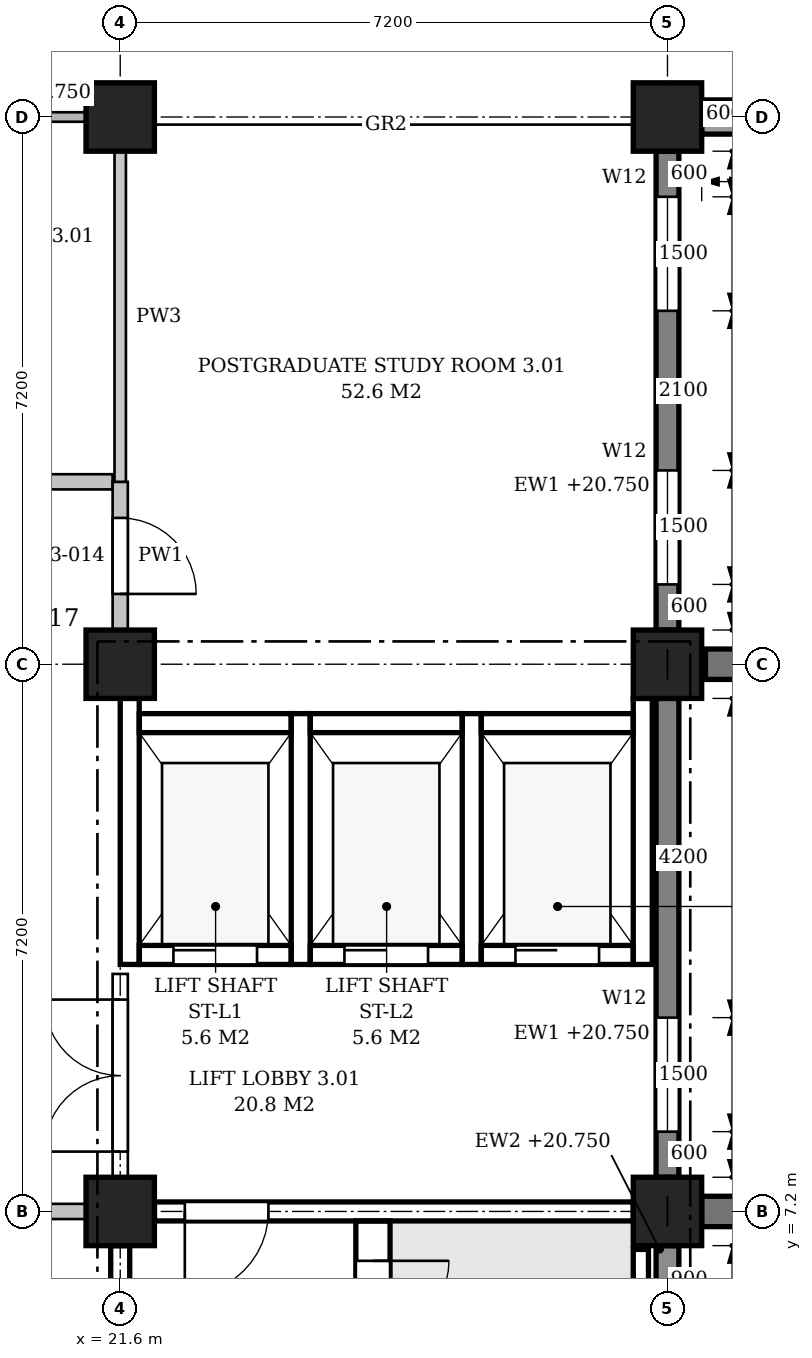
"""IFC4 building model, lengths in metres.
Left out: names, types, materials, properties, quantities, classifications, styles, units other than length and angle.
Written with IfcOpenShell. Run it as: python <this file> out.ifc"""

import sys

from ifc_helpers import new_model, si_unit, direction, frame, frame_2d, origin, origin_2d, place, context, subcontext, project, spatial, polyline, rectangle, outline, extrude, element, fill, save


model = new_model("IFC4")
c1 = context("Model", 3, precision=1e-05, world=origin(), true_north=direction((0.0, 1.0)))
c2 = subcontext(c1, "Body", "Model", "MODEL_VIEW")
j1 = project(units=[si_unit("LENGTHUNIT", "METRE"), si_unit("PLANEANGLEUNIT", "RADIAN")], contexts=[c1])
p1 = place(None, origin())
s1 = spatial("IfcSite", under=j1, at=p1, CompositionType="ELEMENT")
p2 = place(p1, origin())
s2 = spatial("IfcBuilding", under=s1, at=p2, CompositionType="ELEMENT")
p3 = place(p2, frame((0.0, 0.0, 16.8)))
s3 = spatial("IfcBuildingStorey", under=s2, at=p3, CompositionType="ELEMENT", Elevation=16.8)
for number, where, z_axis, x_axis in (
    (1, (21.6, 7.2, 0.0), (0.0, 0.0, 1.0), (1.0, 0.0, 0.0)),
    (2, (21.6, 14.4, 0.0), (0.0, 0.0, 1.0), (1.0, 0.0, 0.0)),
    (3, (21.6, 21.6, 0.0), (0.0, 0.0, 1.0), (1.0, 0.0, 0.0)),
    (4, (28.8, 7.2, 0.0), (0.0, 0.0, 1.0), (1.0, 0.0, 0.0)),
    (5, (28.8, 14.4, 0.0), (0.0, 0.0, 1.0), (1.0, 0.0, 0.0)),
    (6, (28.8, 21.6, 0.0), (0.0, 0.0, 1.0), (1.0, 0.0, 0.0)),
):
    element("IfcColumn", number, at=place(p3, frame(where, z_axis=z_axis, x_axis=x_axis)), inside=s3, PredefinedType="COLUMN", context=c2, shape_type="SweptSolid", body=[
        extrude(rectangle(XDim=0.9, YDim=0.9, at=origin_2d()), origin(), (0.0, 0.0, 1.0), 4.8),
    ])
p4 = place(p3, frame((28.8, 0.45, 0.0), z_axis=(0.0, 0.0, 1.0), x_axis=(0.0, 1.0, 0.0)))
e7 = element("IfcWall", 7, at=p4, inside=s3, PredefinedType="STANDARD", context=c2, shape_type="SweptSolid", body=[
    extrude(rectangle(XDim=6.3, YDim=0.3, at=frame_2d((3.15, 0.0))), origin(), (0.0, 0.0, 1.0), 3.95),
])
p5 = place(p4, frame((0.9, 0.0, 0.9)))
e8 = element("IfcOpeningElement", 8, at=p5, cuts=e7, PredefinedType="OPENING", context=c2, shape_type="SweptSolid", body=[
    extrude(outline(polyline([(0.0, 0.0), (0.9, 0.0), (0.9, 2.05), (0.45, 2.5), (0.0, 2.05), (0.0, 0.0)])), frame((0.0, 0.16, 0.0), z_axis=(0.0, -1.0, 0.0), x_axis=(1.0, 0.0, 0.0)), (0.0, 0.0, 1.0), 0.32),
])
p6 = place(p4, frame((4.5, 0.0, 0.9)))
e9 = element("IfcOpeningElement", 9, at=p6, cuts=e7, PredefinedType="OPENING", context=c2, shape_type="SweptSolid", body=[
    extrude(outline(polyline([(0.0, 0.0), (0.9, 0.0), (0.9, 2.05), (0.45, 2.5), (0.0, 2.05), (0.0, 0.0)])), frame((0.0, 0.16, 0.0), z_axis=(0.0, -1.0, 0.0), x_axis=(1.0, 0.0, 0.0)), (0.0, 0.0, 1.0), 0.32),
])
p7 = place(p3, frame((28.8, 7.65, 0.0), z_axis=(0.0, 0.0, 1.0), x_axis=(0.0, 1.0, 0.0)))
e10 = element("IfcWall", 10, at=p7, inside=s3, PredefinedType="STANDARD", context=c2, shape_type="SweptSolid", body=[
    extrude(rectangle(XDim=6.3, YDim=0.3, at=frame_2d((3.15, 0.0))), origin(), (0.0, 0.0, 1.0), 3.95),
])
p8 = place(p7, frame((0.6, 0.0, 0.9)))
e11 = element("IfcOpeningElement", 11, at=p8, cuts=e10, PredefinedType="OPENING", context=c2, shape_type="SweptSolid", body=[
    extrude(outline(polyline([(0.0, 0.0), (1.5, 0.0), (1.5, 1.75), (0.75, 2.5), (0.0, 1.75), (0.0, 0.0)])), frame((0.0, 0.16, 0.0), z_axis=(0.0, -1.0, 0.0), x_axis=(1.0, 0.0, 0.0)), (0.0, 0.0, 1.0), 0.32),
])
p9 = place(p3, frame((28.8, 14.85, 0.0), z_axis=(0.0, 0.0, 1.0), x_axis=(0.0, 1.0, 0.0)))
e12 = element("IfcWall", 12, at=p9, inside=s3, PredefinedType="STANDARD", context=c2, shape_type="SweptSolid", body=[
    extrude(rectangle(XDim=6.3, YDim=0.3, at=frame_2d((3.15, 0.0))), origin(), (0.0, 0.0, 1.0), 3.95),
])
p10 = place(p9, frame((0.6, 0.0, 0.9)))
e13 = element("IfcOpeningElement", 13, at=p10, cuts=e12, PredefinedType="OPENING", context=c2, shape_type="SweptSolid", body=[
    extrude(outline(polyline([(0.0, 0.0), (1.5, 0.0), (1.5, 1.75), (0.75, 2.5), (0.0, 1.75), (0.0, 0.0)])), frame((0.0, 0.16, 0.0), z_axis=(0.0, -1.0, 0.0), x_axis=(1.0, 0.0, 0.0)), (0.0, 0.0, 1.0), 0.32),
])
p11 = place(p9, frame((4.2, 0.0, 0.9)))
e14 = element("IfcOpeningElement", 14, at=p11, cuts=e12, PredefinedType="OPENING", context=c2, shape_type="SweptSolid", body=[
    extrude(outline(polyline([(0.0, 0.0), (1.5, 0.0), (1.5, 1.75), (0.75, 2.5), (0.0, 1.75), (0.0, 0.0)])), frame((0.0, 0.16, 0.0), z_axis=(0.0, -1.0, 0.0), x_axis=(1.0, 0.0, 0.0)), (0.0, 0.0, 1.0), 0.32),
])
p12 = place(p3, frame((29.25, 21.6, 0.0), z_axis=(0.0, 0.0, 1.0), x_axis=(1.0, 0.0, 0.0)))
e15 = element("IfcWall", 15, at=p12, inside=s3, PredefinedType="STANDARD", context=c2, shape_type="SweptSolid", body=[
    extrude(rectangle(XDim=6.325, YDim=0.45, at=frame_2d((3.163, 0.0))), origin(), (0.0, 0.0, 1.0), 3.5),
])
p13 = place(p12, frame((0.6, 0.0, 0.9)))
e16 = element("IfcOpeningElement", 16, at=p13, cuts=e15, PredefinedType="OPENING", context=c2, shape_type="SweptSolid", body=[
    extrude(outline(polyline([(0.0, 0.0), (1.5, 0.0), (1.5, 1.75), (0.75, 2.5), (0.0, 1.75), (0.0, 0.0)])), frame((0.0, 0.235, 0.0), z_axis=(0.0, -1.0, 0.0), x_axis=(1.0, 0.0, 0.0)), (0.0, 0.0, 1.0), 0.47),
])
p14 = place(p12, frame((4.2, 0.0, 0.9)))
e17 = element("IfcOpeningElement", 17, at=p14, cuts=e15, PredefinedType="OPENING", context=c2, shape_type="SweptSolid", body=[
    extrude(outline(polyline([(0.0, 0.0), (1.5, 0.0), (1.5, 1.75), (0.75, 2.5), (0.0, 1.75), (0.0, 0.0)])), frame((0.0, 0.235, 0.0), z_axis=(0.0, -1.0, 0.0), x_axis=(1.0, 0.0, 0.0)), (0.0, 0.0, 1.0), 0.47),
])
for number, where, z_axis, x_axis in (
    (18, (29.25, 7.2, 0.0), (0.0, 0.0, 1.0), (1.0, 0.0, 0.0)),
    (19, (29.3, 14.4, 0.0), (0.0, 0.0, 1.0), (1.0, 0.0, 0.0)),
):
    element("IfcWall", number, at=place(p3, frame(where, z_axis=z_axis, x_axis=x_axis)), inside=s3, PredefinedType="POLYGONAL", context=c2, shape_type="SweptSolid", body=[
        extrude(outline(polyline([(0.6, 0.0), (0.6, 4.55), (0.0, 4.55), (0.0, 0.0), (0.6, 0.0)])), frame((0.0, 0.2, 0.0), z_axis=(0.0, -1.0, 0.0), x_axis=(1.0, 0.0, 0.0)), (0.0, 0.0, 1.0), 0.4),
    ])
p15 = place(p3, frame((22.05, 7.2, 0.0), z_axis=(0.0, 0.0, 1.0), x_axis=(1.0, 0.0, 0.0)))
e20 = element("IfcWall", 20, at=p15, inside=s3, PredefinedType="SHEAR", context=c2, shape_type="SweptSolid", body=[
    extrude(rectangle(XDim=6.3, YDim=0.25, at=frame_2d((3.15, 0.0))), origin(), (0.0, 0.0, 1.0), 3.8),
])
p16 = place(p15, frame((0.4, 0.0, 0.0)))
e21 = element("IfcOpeningElement", 21, at=p16, cuts=e20, PredefinedType="OPENING", context=c2, shape_type="SweptSolid", body=[
    extrude(rectangle(XDim=1.1, YDim=2.1, at=frame_2d((0.55, 1.05))), frame((0.0, 0.135, 0.0), z_axis=(0.0, -1.0, 0.0), x_axis=(1.0, 0.0, 0.0)), (0.0, 0.0, 1.0), 0.27),
])
p17 = place(p3, frame((21.6, 0.45, 0.0), z_axis=(0.0, 0.0, 1.0), x_axis=(0.0, 1.0, 0.0)))
e22 = element("IfcWall", 22, at=p17, inside=s3, PredefinedType="SHEAR", context=c2, shape_type="SweptSolid", body=[
    extrude(rectangle(XDim=6.3, YDim=0.25, at=frame_2d((3.15, 0.0))), origin(), (0.0, 0.0, 1.0), 3.8),
])
p18 = place(p3, frame((28.45, 5.85, -0.25), z_axis=(0.0, 0.0, 1.0), x_axis=(0.0, 1.0, 0.0)))
e23 = element("IfcWall", 23, at=p18, inside=s3, PredefinedType="SHEAR", context=c2, shape_type="SweptSolid", body=[
    extrude(rectangle(XDim=0.85, YDim=0.2, at=frame_2d((0.425, 0.0))), origin(), (0.0, 0.0, 1.0), 4.8),
])
p19 = place(p3, frame((24.925, 0.225, 0.0), z_axis=(0.0, 0.0, 1.0), x_axis=(0.0, 1.0, 0.0)))
e24 = element("IfcWall", 24, at=p19, inside=s3, PredefinedType="SHEAR", context=c2, shape_type="SweptSolid", body=[
    extrude(rectangle(XDim=6.85, YDim=0.45, at=frame_2d((3.425, 0.0))), origin(), (0.0, 0.0, 1.0), 4.55),
])
p20 = place(p19, frame((5.325, 0.0, 0.0)))
e25 = element("IfcOpeningElement", 25, at=p20, cuts=e24, PredefinedType="OPENING", context=c2, shape_type="SweptSolid", body=[
    extrude(rectangle(XDim=1.0, YDim=2.1, at=frame_2d((0.5, 1.05))), frame((0.0, 0.235, 0.0), z_axis=(0.0, -1.0, 0.0), x_axis=(1.0, 0.0, 0.0)), (0.0, 0.0, 1.0), 0.47),
])
p21 = place(p3, frame((21.725, 10.45, -0.25), z_axis=(0.0, 0.0, 1.0), x_axis=(0.0, 1.0, 0.0)))
e26 = element("IfcWall", 26, at=p21, inside=s3, PredefinedType="SHEAR", context=c2, shape_type="SweptSolid", body=[
    extrude(rectangle(XDim=3.5, YDim=0.25, at=frame_2d((1.75, 0.0))), origin(), (0.0, 0.0, 1.0), 4.05),
])
for number, where, z_axis, x_axis in (
    (27, (23.975, 10.45, -0.25), (0.0, 0.0, 1.0), (0.0, 1.0, 0.0)),
    (28, (26.225, 10.45, -0.25), (0.0, 0.0, 1.0), (0.0, 1.0, 0.0)),
):
    element("IfcWall", number, at=place(p3, frame(where, z_axis=z_axis, x_axis=x_axis)), inside=s3, PredefinedType="SHEAR", context=c2, shape_type="SweptSolid", body=[
        extrude(rectangle(XDim=3.3, YDim=0.25, at=frame_2d((1.65, 0.0))), origin(), (0.0, 0.0, 1.0), 4.8),
    ])
p22 = place(p3, frame((28.475, 10.45, -0.25), z_axis=(0.0, 0.0, 1.0), x_axis=(0.0, 1.0, 0.0)))
e29 = element("IfcWall", 29, at=p22, inside=s3, PredefinedType="SHEAR", context=c2, shape_type="SweptSolid", body=[
    extrude(rectangle(XDim=3.5, YDim=0.25, at=frame_2d((1.75, 0.0))), origin(), (0.0, 0.0, 1.0), 4.8),
])
p23 = place(p3, frame((21.85, 10.575, -0.25), z_axis=(0.0, 0.0, 1.0), x_axis=(1.0, 0.0, 0.0)))
e30 = element("IfcWall", 30, at=p23, inside=s3, PredefinedType="SHEAR", context=c2, shape_type="SweptSolid", body=[
    extrude(rectangle(XDim=2.0, YDim=0.25, at=frame_2d((1.0, 0.0))), origin(), (0.0, 0.0, 1.0), 4.8),
])
p24 = place(p23, frame((0.45, 0.0, 0.25)))
e31 = element("IfcOpeningElement", 31, at=p24, cuts=e30, PredefinedType="OPENING", context=c2, shape_type="SweptSolid", body=[
    extrude(rectangle(XDim=1.1, YDim=2.1, at=frame_2d((0.55, 1.05))), frame((0.0, 0.135, 0.0), z_axis=(0.0, -1.0, 0.0), x_axis=(1.0, 0.0, 0.0)), (0.0, 0.0, 1.0), 0.27),
])
p25 = place(p3, frame((21.85, 13.625, -0.25), z_axis=(0.0, 0.0, 1.0), x_axis=(1.0, 0.0, 0.0)))
e32 = element("IfcWall", 32, at=p25, inside=s3, PredefinedType="SHEAR", context=c2, shape_type="SweptSolid", body=[
    extrude(rectangle(XDim=2.0, YDim=0.25, at=frame_2d((1.0, 0.0))), origin(), (0.0, 0.0, 1.0), 4.8),
])
p26 = place(p3, frame((24.1, 10.575, -0.25), z_axis=(0.0, 0.0, 1.0), x_axis=(1.0, 0.0, 0.0)))
e33 = element("IfcWall", 33, at=p26, inside=s3, PredefinedType="SHEAR", context=c2, shape_type="SweptSolid", body=[
    extrude(rectangle(XDim=2.0, YDim=0.25, at=frame_2d((1.0, 0.0))), origin(), (0.0, 0.0, 1.0), 4.8),
])
p27 = place(p26, frame((0.45, 0.0, 0.25)))
e34 = element("IfcOpeningElement", 34, at=p27, cuts=e33, PredefinedType="OPENING", context=c2, shape_type="SweptSolid", body=[
    extrude(rectangle(XDim=1.1, YDim=2.1, at=frame_2d((0.55, 1.05))), frame((0.0, 0.135, 0.0), z_axis=(0.0, -1.0, 0.0), x_axis=(1.0, 0.0, 0.0)), (0.0, 0.0, 1.0), 0.27),
])
p28 = place(p3, frame((24.1, 13.625, -0.25), z_axis=(0.0, 0.0, 1.0), x_axis=(1.0, 0.0, 0.0)))
e35 = element("IfcWall", 35, at=p28, inside=s3, PredefinedType="SHEAR", context=c2, shape_type="SweptSolid", body=[
    extrude(rectangle(XDim=2.0, YDim=0.25, at=frame_2d((1.0, 0.0))), origin(), (0.0, 0.0, 1.0), 4.8),
])
p29 = place(p3, frame((26.35, 10.575, -0.25), z_axis=(0.0, 0.0, 1.0), x_axis=(1.0, 0.0, 0.0)))
e36 = element("IfcWall", 36, at=p29, inside=s3, PredefinedType="SHEAR", context=c2, shape_type="SweptSolid", body=[
    extrude(rectangle(XDim=2.0, YDim=0.25, at=frame_2d((1.0, 0.0))), origin(), (0.0, 0.0, 1.0), 4.8),
])
p30 = place(p29, frame((0.45, 0.0, 0.25)))
e37 = element("IfcOpeningElement", 37, at=p30, cuts=e36, PredefinedType="OPENING", context=c2, shape_type="SweptSolid", body=[
    extrude(rectangle(XDim=1.1, YDim=2.1, at=frame_2d((0.55, 1.05))), frame((0.0, 0.135, 0.0), z_axis=(0.0, -1.0, 0.0), x_axis=(1.0, 0.0, 0.0)), (0.0, 0.0, 1.0), 0.27),
])
p31 = place(p3, frame((26.35, 13.625, -0.25), z_axis=(0.0, 0.0, 1.0), x_axis=(1.0, 0.0, 0.0)))
e38 = element("IfcWall", 38, at=p31, inside=s3, PredefinedType="SHEAR", context=c2, shape_type="SweptSolid", body=[
    extrude(rectangle(XDim=2.0, YDim=0.25, at=frame_2d((1.0, 0.0))), origin(), (0.0, 0.0, 1.0), 4.8),
])
p32 = place(p3, frame((14.85, 7.2, 0.0), z_axis=(0.0, 0.0, 1.0), x_axis=(1.0, 0.0, 0.0)))
e39 = element("IfcWall", 39, at=p32, inside=s3, PredefinedType="PARTITIONING", context=c2, shape_type="SweptSolid", body=[
    extrude(rectangle(XDim=6.3, YDim=0.2, at=frame_2d((3.15, 0.0))), origin(), (0.0, 0.0, 1.0), 3.8),
])
p33 = place(p32, frame((4.225, 0.0, 0.0)))
e40 = element("IfcOpeningElement", 40, at=p33, cuts=e39, PredefinedType="OPENING", context=c2, shape_type="SweptSolid", body=[
    extrude(rectangle(XDim=1.0, YDim=2.1, at=frame_2d((0.5, 1.05))), frame((0.0, 0.11, 0.0), z_axis=(0.0, -1.0, 0.0), x_axis=(1.0, 0.0, 0.0)), (0.0, 0.0, 1.0), 0.22),
])
p34 = place(p3, frame((18.1, 16.8, 0.0), z_axis=(0.0, 0.0, 1.0), x_axis=(1.0, 0.0, 0.0)))
e41 = element("IfcWall", 41, at=p34, inside=s3, PredefinedType="PARTITIONING", context=c2, shape_type="SweptSolid", body=[
    extrude(outline(polyline([(0.0, 0.0), (3.4, 0.0), (3.4, 3.8), (3.25, 3.8), (3.25, 4.55), (0.0, 4.55), (0.0, 0.0)])), frame((0.0, 0.1, 0.0), z_axis=(0.0, -1.0, 0.0), x_axis=(1.0, 0.0, 0.0)), (0.0, 0.0, 1.0), 0.2),
])
p35 = place(p34, frame((1.2, 0.0, 0.0)))
e42 = element("IfcOpeningElement", 42, at=p35, cuts=e41, PredefinedType="OPENING", context=c2, shape_type="SweptSolid", body=[
    extrude(rectangle(XDim=1.0, YDim=2.1, at=frame_2d((0.5, 1.05))), frame((0.0, 0.11, 0.0), z_axis=(0.0, -1.0, 0.0), x_axis=(1.0, 0.0, 0.0)), (0.0, 0.0, 1.0), 0.22),
])
p36 = place(p3, frame((21.6, 7.65, 0.0), z_axis=(0.0, 0.0, 1.0), x_axis=(0.0, 1.0, 0.0)))
e43 = element("IfcWall", 43, at=p36, inside=s3, PredefinedType="PARTITIONING", context=c2, shape_type="SweptSolid", body=[
    extrude(rectangle(XDim=2.675, YDim=0.2, at=frame_2d((1.337, 0.0))), origin(), (0.0, 0.0, 1.0), 3.8),
])
p37 = place(p36, frame((0.337, 0.0, 0.0)))
e44 = element("IfcOpeningElement", 44, at=p37, cuts=e43, PredefinedType="OPENING", context=c2, shape_type="SweptSolid", body=[
    extrude(rectangle(XDim=2.0, YDim=2.4, at=frame_2d((1.0, 1.2))), frame((0.0, 0.11, 0.0), z_axis=(0.0, -1.0, 0.0), x_axis=(1.0, 0.0, 0.0)), (0.0, 0.0, 1.0), 0.22),
])
p38 = place(p3, frame((21.6, 14.85, 0.0), z_axis=(0.0, 0.0, 1.0), x_axis=(0.0, 1.0, 0.0)))
e45 = element("IfcWall", 45, at=p38, inside=s3, PredefinedType="PARTITIONING", context=c2, shape_type="SweptSolid", body=[
    extrude(rectangle(XDim=1.95, YDim=0.2, at=frame_2d((0.975, 0.0))), origin(), (0.0, 0.0, 1.0), 3.8),
])
p39 = place(p38, frame((0.475, 0.0, 0.0)))
e46 = element("IfcOpeningElement", 46, at=p39, cuts=e45, PredefinedType="OPENING", context=c2, shape_type="SweptSolid", body=[
    extrude(rectangle(XDim=1.0, YDim=2.1, at=frame_2d((0.5, 1.05))), frame((0.0, 0.11, 0.0), z_axis=(0.0, -1.0, 0.0), x_axis=(1.0, 0.0, 0.0)), (0.0, 0.0, 1.0), 0.22),
])
p40 = place(p3, frame((21.6, 16.8, 0.0), z_axis=(0.0, 0.0, 1.0), x_axis=(0.0, 1.0, 0.0)))
e47 = element("IfcWall", 47, at=p40, inside=s3, PredefinedType="PARTITIONING", context=c2, shape_type="SweptSolid", body=[
    extrude(rectangle(XDim=4.35, YDim=0.15, at=frame_2d((2.175, 0.0))), origin(), (0.0, 0.0, 1.0), 3.8),
])
p41 = place(p8, origin())
e48 = element("IfcWindow", 48, at=p41, inside=s3, PartitioningType="SINGLE_PANEL", PredefinedType="WINDOW", context=c2, shape_type="SweptSolid", body=[
    extrude(outline(polyline([(0.0, 0.0), (1.5, 0.0), (1.5, 1.75), (0.75, 2.5), (0.0, 1.75), (0.0, 0.0)])), frame((0.0, 0.03, 0.0), z_axis=(0.0, -1.0, 0.0), x_axis=(1.0, 0.0, 0.0)), (0.0, 0.0, 1.0), 0.06),
])
fill(e11, e48)
p42 = place(p10, origin())
e49 = element("IfcWindow", 49, at=p42, inside=s3, PartitioningType="SINGLE_PANEL", PredefinedType="WINDOW", context=c2, shape_type="SweptSolid", body=[
    extrude(outline(polyline([(0.0, 0.0), (1.5, 0.0), (1.5, 1.75), (0.75, 2.5), (0.0, 1.75), (0.0, 0.0)])), frame((0.0, 0.03, 0.0), z_axis=(0.0, -1.0, 0.0), x_axis=(1.0, 0.0, 0.0)), (0.0, 0.0, 1.0), 0.06),
])
fill(e13, e49)
p43 = place(p11, origin())
e50 = element("IfcWindow", 50, at=p43, inside=s3, PartitioningType="SINGLE_PANEL", PredefinedType="WINDOW", context=c2, shape_type="SweptSolid", body=[
    extrude(outline(polyline([(0.0, 0.0), (1.5, 0.0), (1.5, 1.75), (0.75, 2.5), (0.0, 1.75), (0.0, 0.0)])), frame((0.0, 0.03, 0.0), z_axis=(0.0, -1.0, 0.0), x_axis=(1.0, 0.0, 0.0)), (0.0, 0.0, 1.0), 0.06),
])
fill(e14, e50)
p44 = place(p20, frame((1.0, 0.0, 0.0), z_axis=(0.0, 0.0, 1.0), x_axis=(-1.0, 0.0, 0.0)))
e51 = element("IfcDoor", 51, at=p44, inside=s3, OperationType="SINGLE_SWING_LEFT", PredefinedType="DOOR", context=c2, shape_type="SweptSolid", body=[
    extrude(rectangle(XDim=1.0, YDim=2.1, at=frame_2d((0.5, 1.05))), frame((0.0, 0.025, 0.0), z_axis=(0.0, -1.0, 0.0), x_axis=(1.0, 0.0, 0.0)), (0.0, 0.0, 1.0), 0.05),
])
fill(e25, e51)
p45 = place(p16, frame((1.1, 0.0, 0.0), z_axis=(0.0, 0.0, 1.0), x_axis=(-1.0, 0.0, 0.0)))
e52 = element("IfcDoor", 52, at=p45, inside=s3, OperationType="SINGLE_SWING_RIGHT", PredefinedType="DOOR", context=c2, shape_type="SweptSolid", body=[
    extrude(rectangle(XDim=1.1, YDim=2.1, at=frame_2d((0.55, 1.05))), frame((0.0, 0.025, 0.0), z_axis=(0.0, -1.0, 0.0), x_axis=(1.0, 0.0, 0.0)), (0.0, 0.0, 1.0), 0.05),
])
fill(e21, e52)
p46 = place(p24, origin())
e53 = element("IfcDoor", 53, at=p46, inside=s3, OperationType="SLIDING_TO_LEFT", PredefinedType="DOOR", context=c2, shape_type="SweptSolid", body=[
    extrude(rectangle(XDim=1.1, YDim=2.1, at=frame_2d((0.55, 1.05))), frame((0.0, 0.025, 0.0), z_axis=(0.0, -1.0, 0.0), x_axis=(1.0, 0.0, 0.0)), (0.0, 0.0, 1.0), 0.05),
])
fill(e31, e53)
p47 = place(p27, origin())
e54 = element("IfcDoor", 54, at=p47, inside=s3, OperationType="SLIDING_TO_LEFT", PredefinedType="DOOR", context=c2, shape_type="SweptSolid", body=[
    extrude(rectangle(XDim=1.1, YDim=2.1, at=frame_2d((0.55, 1.05))), frame((0.0, 0.025, 0.0), z_axis=(0.0, -1.0, 0.0), x_axis=(1.0, 0.0, 0.0)), (0.0, 0.0, 1.0), 0.05),
])
fill(e34, e54)
p48 = place(p30, origin())
e55 = element("IfcDoor", 55, at=p48, inside=s3, OperationType="SLIDING_TO_LEFT", PredefinedType="DOOR", context=c2, shape_type="SweptSolid", body=[
    extrude(rectangle(XDim=1.1, YDim=2.1, at=frame_2d((0.55, 1.05))), frame((0.0, 0.025, 0.0), z_axis=(0.0, -1.0, 0.0), x_axis=(1.0, 0.0, 0.0)), (0.0, 0.0, 1.0), 0.05),
])
fill(e37, e55)
p49 = place(p37, origin())
e56 = element("IfcDoor", 56, at=p49, inside=s3, OperationType="DOUBLE_DOOR_SINGLE_SWING", PredefinedType="DOOR", context=c2, shape_type="SweptSolid", body=[
    extrude(rectangle(XDim=2.0, YDim=2.4, at=frame_2d((1.0, 1.2))), frame((0.0, 0.025, 0.0), z_axis=(0.0, -1.0, 0.0), x_axis=(1.0, 0.0, 0.0)), (0.0, 0.0, 1.0), 0.05),
])
fill(e44, e56)
p50 = place(p39, frame((1.0, 0.0, 0.0), z_axis=(0.0, 0.0, 1.0), x_axis=(-1.0, 0.0, 0.0)))
e57 = element("IfcDoor", 57, at=p50, inside=s3, OperationType="SINGLE_SWING_RIGHT", PredefinedType="DOOR", context=c2, shape_type="SweptSolid", body=[
    extrude(rectangle(XDim=1.0, YDim=2.1, at=frame_2d((0.5, 1.05))), frame((0.0, 0.025, 0.0), z_axis=(0.0, -1.0, 0.0), x_axis=(1.0, 0.0, 0.0)), (0.0, 0.0, 1.0), 0.05),
])
fill(e46, e57)
save(model, sys.argv[1])
